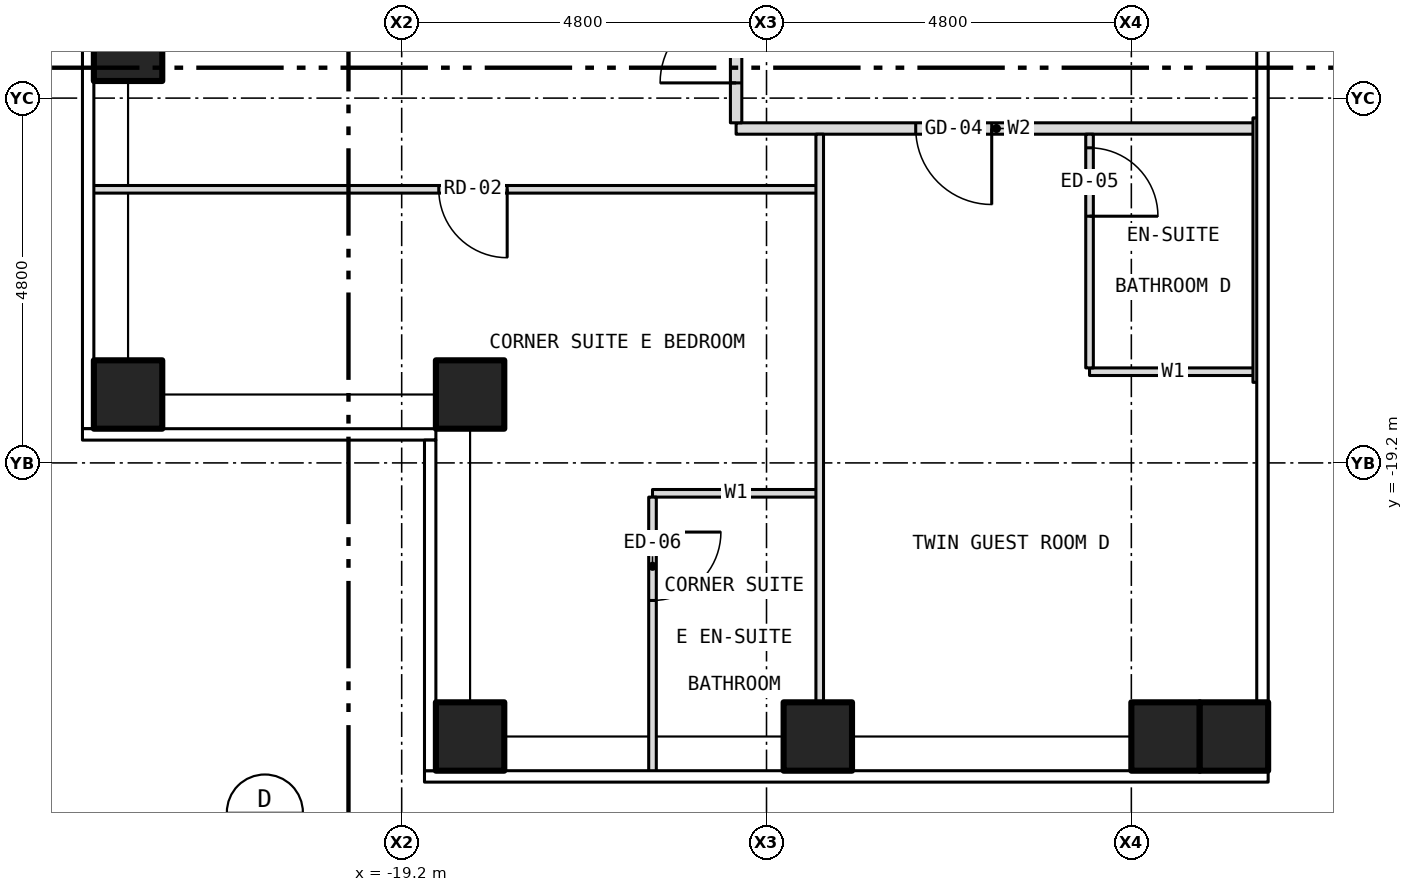
"""IFC4 building model, lengths in metres.
Left out: names, types, materials, properties, quantities, classifications, styles, units other than length and angle.
Written with IfcOpenShell. Run it as: python <this file> out.ifc"""

import sys

from ifc_helpers import new_model, si_unit, direction, frame, frame_2d, origin, origin_2d, place, context, subcontext, project, spatial, rectangle, hollow_rectangle, extrude, element, fill, save


model = new_model("IFC4")
c1 = context("Model", 3, precision=1e-05, world=origin(), true_north=direction((0.0, 1.0)))
c2 = subcontext(c1, "Body", "Model", "MODEL_VIEW")
j1 = project(units=[si_unit("LENGTHUNIT", "METRE"), si_unit("PLANEANGLEUNIT", "RADIAN")], contexts=[c1])
p1 = place(None, origin())
s1 = spatial("IfcSite", under=j1, at=p1, CompositionType="ELEMENT")
p2 = place(p1, origin())
s2 = spatial("IfcBuilding", under=s1, at=p2, CompositionType="ELEMENT")
p3 = place(p2, frame((0.0, 0.0, 127.5)))
s3 = spatial("IfcBuildingStorey", under=s2, at=p3, CompositionType="ELEMENT", Elevation=127.5)
for number, where, z_axis, x_axis in (
    (1, (-18.3, -22.8, -0.15), (0.0, 0.0, 1.0), (1.0, 0.0, 0.0)),
    (2, (-13.725, -22.8, -0.15), (0.0, 0.0, 1.0), (1.0, 0.0, 0.0)),
    (3, (-9.15, -22.8, -0.15), (0.0, 0.0, 1.0), (1.0, 0.0, 0.0)),
    (4, (-22.8, -18.3, -0.15), (0.0, 0.0, 1.0), (1.0, 0.0, 0.0)),
    (5, (-22.8, -13.725, -0.15), (0.0, 0.0, 1.0), (1.0, 0.0, 0.0)),
    (6, (-18.3, -18.3, -0.15), (0.0, 0.0, 1.0), (1.0, 0.0, 0.0)),
    (7, (-8.25, -22.8, -0.15), (0.0, 0.0, 1.0), (1.0, 0.0, 0.0)),
):
    element("IfcColumn", number, at=place(p3, frame(where, z_axis=z_axis, x_axis=x_axis)), inside=s3, PredefinedType="COLUMN", context=c2, shape_type="SweptSolid", body=[
        extrude(hollow_rectangle(XDim=0.9, YDim=0.9, WallThickness=0.05, at=origin_2d()), origin(), (0.0, 0.0, 1.0), 3.5),
    ])
for number, where, z_axis, x_axis in (
    (8, (-15.9, -19.6, 0.0), (0.0, 0.0, 1.0), (1.0, 0.0, 0.0)),
    (9, (-10.15, -18.0, 0.0), (0.0, 0.0, 1.0), (1.0, 0.0, 0.0)),
):
    element("IfcWall", number, at=place(p3, frame(where, z_axis=z_axis, x_axis=x_axis)), inside=s3, PredefinedType="PARTITIONING", context=c2, shape_type="SweptSolid", body=[
        extrude(rectangle(XDim=2.2, YDim=0.1, at=frame_2d((1.1, 0.0))), origin(), (0.0, 0.0, 1.0), 3.35),
    ])
p4 = place(p3, frame((-23.28, -15.6, 0.0), z_axis=(0.0, 0.0, 1.0), x_axis=(1.0, 0.0, 0.0)))
e10 = element("IfcWall", 10, at=p4, inside=s3, PredefinedType="PARTITIONING", context=c2, shape_type="SweptSolid", body=[
    extrude(rectangle(XDim=9.58, YDim=0.1, at=frame_2d((4.79, 0.0))), origin(), (0.0, 0.0, 1.0), 3.35),
])
p5 = place(p4, frame((4.568, 0.0, 0.0)))
e11 = element("IfcOpeningElement", 11, at=p5, cuts=e10, PredefinedType="OPENING", context=c2, shape_type="SweptSolid", body=[
    extrude(rectangle(XDim=0.9, YDim=2.1, at=frame_2d((0.45, 1.05))), frame((0.0, 0.062, 0.0), z_axis=(0.0, -1.0, 0.0), x_axis=(1.0, 0.0, 0.0)), (0.0, 0.0, 1.0), 0.124),
])
p6 = place(p3, frame((-14.8, -14.8, 0.0), z_axis=(0.0, 0.0, 1.0), x_axis=(1.0, 0.0, 0.0)))
e12 = element("IfcWall", 12, at=p6, inside=s3, PredefinedType="PARTITIONING", context=c2, shape_type="SweptSolid", body=[
    extrude(rectangle(XDim=6.85, YDim=0.15, at=frame_2d((3.425, 0.0))), origin(), (0.0, 0.0, 1.0), 3.35),
])
p7 = place(p6, frame((2.363, 0.0, 0.0)))
e13 = element("IfcOpeningElement", 13, at=p7, cuts=e12, PredefinedType="OPENING", context=c2, shape_type="SweptSolid", body=[
    extrude(rectangle(XDim=1.0, YDim=2.1, at=frame_2d((0.5, 1.05))), frame((0.0, 0.087, 0.0), z_axis=(0.0, -1.0, 0.0), x_axis=(1.0, 0.0, 0.0)), (0.0, 0.0, 1.0), 0.174),
])
p8 = place(p3, frame((-15.9, -23.28, 0.0), z_axis=(0.0, 0.0, 1.0), x_axis=(0.0, 1.0, 0.0)))
e14 = element("IfcWall", 14, at=p8, inside=s3, PredefinedType="PARTITIONING", context=c2, shape_type="SweptSolid", body=[
    extrude(rectangle(XDim=3.63, YDim=0.1, at=frame_2d((1.815, 0.0))), origin(), (0.0, 0.0, 1.0), 3.35),
])
p9 = place(p8, frame((2.27, 0.0, 0.0)))
e15 = element("IfcOpeningElement", 15, at=p9, cuts=e14, PredefinedType="OPENING", context=c2, shape_type="SweptSolid", body=[
    extrude(rectangle(XDim=0.9, YDim=2.1, at=frame_2d((0.45, 1.05))), frame((0.0, 0.062, 0.0), z_axis=(0.0, -1.0, 0.0), x_axis=(1.0, 0.0, 0.0)), (0.0, 0.0, 1.0), 0.124),
])
p10 = place(p3, frame((-14.8, -14.725, 0.0), z_axis=(0.0, 0.0, 1.0), x_axis=(0.0, 1.0, 0.0)))
e16 = element("IfcWall", 16, at=p10, inside=s3, PredefinedType="PARTITIONING", context=c2, shape_type="SweptSolid", body=[
    extrude(rectangle(XDim=3.85, YDim=0.15, at=frame_2d((1.925, 0.0))), origin(), (0.0, 0.0, 1.0), 3.35),
])
p11 = place(p10, frame((0.525, 0.0, 0.0)))
e17 = element("IfcOpeningElement", 17, at=p11, cuts=e16, PredefinedType="OPENING", context=c2, shape_type="SweptSolid", body=[
    extrude(rectangle(XDim=1.0, YDim=2.1, at=frame_2d((0.5, 1.05))), frame((0.0, 0.087, 0.0), z_axis=(0.0, -1.0, 0.0), x_axis=(1.0, 0.0, 0.0)), (0.0, 0.0, 1.0), 0.174),
])
p12 = place(p3, frame((-13.7, -22.68, 0.0), z_axis=(0.0, 0.0, 1.0), x_axis=(0.0, 1.0, 0.0)))
e18 = element("IfcWall", 18, at=p12, inside=s3, PredefinedType="PARTITIONING", context=c2, shape_type="SweptSolid", body=[
    extrude(rectangle(XDim=7.805, YDim=0.1, at=frame_2d((3.902, 0.0))), origin(), (0.0, 0.0, 1.0), 3.35),
])
p13 = place(p3, frame((-10.15, -17.95, 0.0), z_axis=(0.0, 0.0, 1.0), x_axis=(0.0, 1.0, 0.0)))
e19 = element("IfcWall", 19, at=p13, inside=s3, PredefinedType="PARTITIONING", context=c2, shape_type="SweptSolid", body=[
    extrude(rectangle(XDim=3.075, YDim=0.1, at=frame_2d((1.538, 0.0))), origin(), (0.0, 0.0, 1.0), 3.35),
])
p14 = place(p13, frame((1.996, 0.0, 0.0)))
e20 = element("IfcOpeningElement", 20, at=p14, cuts=e19, PredefinedType="OPENING", context=c2, shape_type="SweptSolid", body=[
    extrude(rectangle(XDim=0.9, YDim=2.1, at=frame_2d((0.45, 1.05))), frame((0.0, 0.062, 0.0), z_axis=(0.0, -1.0, 0.0), x_axis=(1.0, 0.0, 0.0)), (0.0, 0.0, 1.0), 0.124),
])
p15 = place(p3, frame((-7.95, -18.14, 0.0), z_axis=(0.0, 0.0, 1.0), x_axis=(0.0, 1.0, 0.0)))
e21 = element("IfcWall", 21, at=p15, inside=s3, PredefinedType="PARTITIONING", context=c2, shape_type="SweptSolid", body=[
    extrude(rectangle(XDim=3.48, YDim=0.1, at=frame_2d((1.74, 0.0))), origin(), (0.0, 0.0, 1.0), 2.733),
])
p16 = place(p7, origin())
e22 = element("IfcDoor", 22, at=p16, inside=s3, OperationType="SINGLE_SWING_RIGHT", PredefinedType="DOOR", context=c2, shape_type="SweptSolid", body=[
    extrude(rectangle(XDim=1.0, YDim=2.1, at=frame_2d((0.5, 1.05))), frame((0.0, 0.025, 0.0), z_axis=(0.0, -1.0, 0.0), x_axis=(1.0, 0.0, 0.0)), (0.0, 0.0, 1.0), 0.05),
])
fill(e13, e22)
p17 = place(p14, origin())
e23 = element("IfcDoor", 23, at=p17, inside=s3, OperationType="SINGLE_SWING_LEFT", PredefinedType="DOOR", context=c2, shape_type="SweptSolid", body=[
    extrude(rectangle(XDim=0.9, YDim=2.1, at=frame_2d((0.45, 1.05))), frame((0.0, 0.025, 0.0), z_axis=(0.0, -1.0, 0.0), x_axis=(1.0, 0.0, 0.0)), (0.0, 0.0, 1.0), 0.05),
])
fill(e20, e23)
p18 = place(p11, origin())
e24 = element("IfcDoor", 24, at=p18, inside=s3, OperationType="SINGLE_SWING_LEFT", PredefinedType="DOOR", context=c2, shape_type="SweptSolid", body=[
    extrude(rectangle(XDim=1.0, YDim=2.1, at=frame_2d((0.5, 1.05))), frame((0.0, 0.025, 0.0), z_axis=(0.0, -1.0, 0.0), x_axis=(1.0, 0.0, 0.0)), (0.0, 0.0, 1.0), 0.05),
])
fill(e17, e24)
p19 = place(p5, origin())
e25 = element("IfcDoor", 25, at=p19, inside=s3, OperationType="SINGLE_SWING_RIGHT", PredefinedType="DOOR", context=c2, shape_type="SweptSolid", body=[
    extrude(rectangle(XDim=0.9, YDim=2.1, at=frame_2d((0.45, 1.05))), frame((0.0, 0.025, 0.0), z_axis=(0.0, -1.0, 0.0), x_axis=(1.0, 0.0, 0.0)), (0.0, 0.0, 1.0), 0.05),
])
fill(e11, e25)
p20 = place(p9, origin())
e26 = element("IfcDoor", 26, at=p20, inside=s3, OperationType="SINGLE_SWING_RIGHT", PredefinedType="DOOR", context=c2, shape_type="SweptSolid", body=[
    extrude(rectangle(XDim=0.9, YDim=2.1, at=frame_2d((0.45, 1.05))), frame((0.0, 0.025, 0.0), z_axis=(0.0, -1.0, 0.0), x_axis=(1.0, 0.0, 0.0)), (0.0, 0.0, 1.0), 0.05),
])
fill(e15, e26)
save(model, sys.argv[1])
